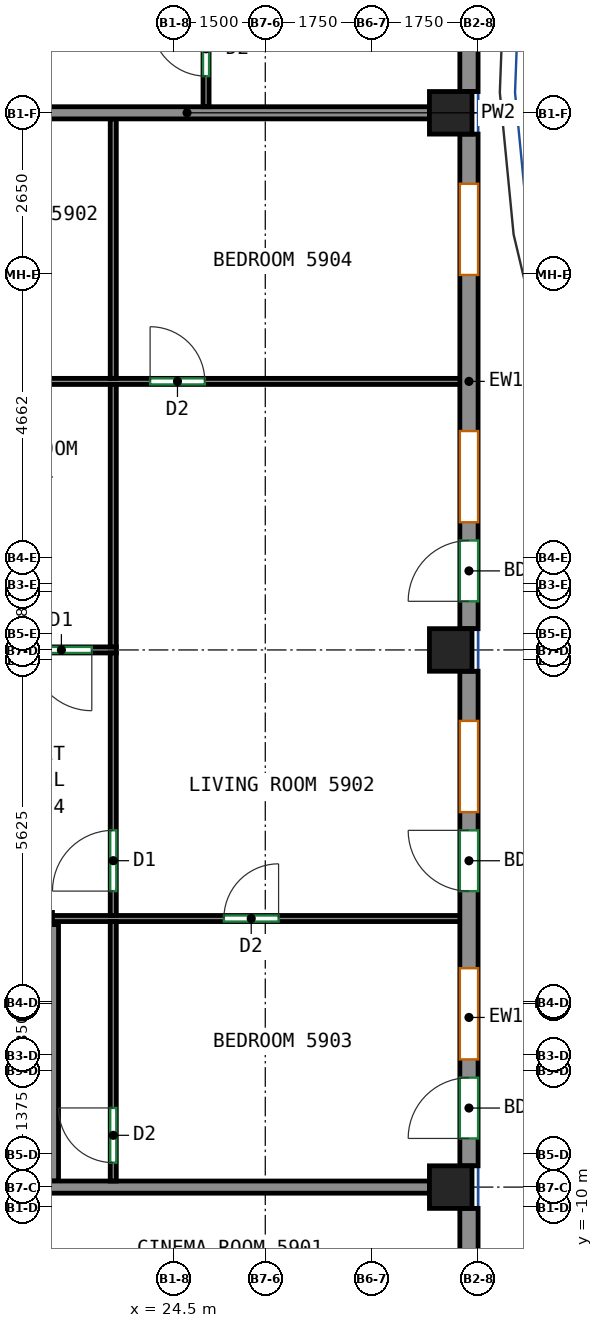
"""IFC4 building model, lengths in metres.
Left out: names, types, materials, properties, quantities, classifications, styles, units other than length and angle.
Written with IfcOpenShell. Run it as: python <this file> out.ifc"""

import sys

from ifc_helpers import new_model, si_unit, direction, frame, frame_2d, origin, origin_2d, place, context, subcontext, project, spatial, rectangle, extrude, source, transform, mapped, element, fill, save


model = new_model("IFC4")
c1 = context("Model", 3, precision=1e-05, world=origin(), true_north=direction((0.0, 1.0)))
c2 = subcontext(c1, "Body", "Model", "MODEL_VIEW")
j1 = project(units=[si_unit("LENGTHUNIT", "METRE"), si_unit("PLANEANGLEUNIT", "RADIAN")], contexts=[c1])
p1 = place(None, origin())
s1 = spatial("IfcSite", under=j1, at=p1, CompositionType="ELEMENT")
p2 = place(p1, origin())
s2 = spatial("IfcBuilding", under=s1, at=p2, CompositionType="ELEMENT")
p3 = place(p2, frame((0.0, 0.0, 245.8)))
s3 = spatial("IfcBuildingStorey", under=s2, at=p3, CompositionType="ELEMENT", Elevation=245.8)
m1 = source(origin(), c2, "Body", "SweptSolid", [
    extrude(rectangle(XDim=0.7, YDim=0.7, at=origin_2d()), origin(), (0.0, 0.0, 1.0), 3.12),
])
for number, where, z_axis, x_axis in (
    (1, (29.05, -9.667, 0.0), (0.0, 0.0, 1.0), (1.0, 0.0, 0.0)),
    (2, (29.05, -0.833, 0.0), (0.0, 0.0, 1.0), (1.0, 0.0, 0.0)),
    (3, (29.05, 8.0, 0.0), (0.0, 0.0, 1.0), (1.0, 0.0, 0.0)),
):
    element("IfcColumn", number, at=place(p3, frame(where, z_axis=z_axis, x_axis=x_axis)), inside=s3, PredefinedType="COLUMN", context=c2, shape_type="MappedRepresentation", body=[
        mapped(m1, transform((0.0, 0.0, 0.0))),
    ])
m2 = source(origin(), c2, "Body", "SweptSolid", [
    extrude(rectangle(XDim=4.315, YDim=0.3, at=frame_2d((2.158, 0.0))), origin(), (0.0, 0.0, 1.0), 3.12),
])
p4 = place(p3, frame((29.35, -14.332, 0.0), z_axis=(0.0, 0.0, 1.0), x_axis=(0.0, 1.0, 0.0)))
e4 = element("IfcWall", 4, at=p4, inside=s3, PredefinedType="SOLIDWALL", context=c2, shape_type="MappedRepresentation", body=[
    mapped(m2, transform((0.0, 0.0, 0.0))),
])
p5 = place(p4, frame((1.75, 0.0, 0.8)))
e5 = element("IfcOpeningElement", 5, at=p5, cuts=e4, PredefinedType="OPENING", context=c2, shape_type="SweptSolid", body=[
    extrude(rectangle(XDim=1.5, YDim=2.05, at=frame_2d((0.75, 1.025))), frame((0.0, 0.16, 0.0), z_axis=(0.0, -1.0, 0.0), x_axis=(1.0, 0.0, 0.0)), (0.0, 0.0, 1.0), 0.32),
])
m3 = source(origin(), c2, "Body", "SweptSolid", [
    extrude(rectangle(XDim=8.133, YDim=0.3, at=frame_2d((4.067, 0.0))), origin(), (0.0, 0.0, 1.0), 3.12),
])
p6 = place(p3, frame((29.35, -9.317, 0.0), z_axis=(0.0, 0.0, 1.0), x_axis=(0.0, 1.0, 0.0)))
e6 = element("IfcWall", 6, at=p6, inside=s3, PredefinedType="SOLIDWALL", context=c2, shape_type="MappedRepresentation", body=[
    mapped(m3, transform((0.0, 0.0, 0.0))),
])
p7 = place(p6, frame((1.75, 0.0, 0.8)))
e7 = element("IfcOpeningElement", 7, at=p7, cuts=e6, PredefinedType="OPENING", context=c2, shape_type="SweptSolid", body=[
    extrude(rectangle(XDim=1.5, YDim=2.05, at=frame_2d((0.75, 1.025))), frame((0.0, 0.16, 0.0), z_axis=(0.0, -1.0, 0.0), x_axis=(1.0, 0.0, 0.0)), (0.0, 0.0, 1.0), 0.32),
])
p8 = place(p6, frame((0.45, 0.0, 0.0)))
e8 = element("IfcOpeningElement", 8, at=p8, cuts=e6, PredefinedType="OPENING", context=c2, shape_type="SweptSolid", body=[
    extrude(rectangle(XDim=1.0, YDim=2.1, at=frame_2d((0.5, 1.05))), frame((0.0, 0.16, 0.0), z_axis=(0.0, -1.0, 0.0), x_axis=(1.0, 0.0, 0.0)), (0.0, 0.0, 1.0), 0.32),
])
p9 = place(p6, frame((5.817, 0.0, 0.8)))
e9 = element("IfcOpeningElement", 9, at=p9, cuts=e6, PredefinedType="OPENING", context=c2, shape_type="SweptSolid", body=[
    extrude(rectangle(XDim=1.5, YDim=2.05, at=frame_2d((0.75, 1.025))), frame((0.0, 0.16, 0.0), z_axis=(0.0, -1.0, 0.0), x_axis=(1.0, 0.0, 0.0)), (0.0, 0.0, 1.0), 0.32),
])
p10 = place(p6, frame((4.517, 0.0, 0.0)))
e10 = element("IfcOpeningElement", 10, at=p10, cuts=e6, PredefinedType="OPENING", context=c2, shape_type="SweptSolid", body=[
    extrude(rectangle(XDim=1.0, YDim=2.1, at=frame_2d((0.5, 1.05))), frame((0.0, 0.16, 0.0), z_axis=(0.0, -1.0, 0.0), x_axis=(1.0, 0.0, 0.0)), (0.0, 0.0, 1.0), 0.32),
])
p11 = place(p3, frame((29.35, -0.483, 0.0), z_axis=(0.0, 0.0, 1.0), x_axis=(0.0, 1.0, 0.0)))
e11 = element("IfcWall", 11, at=p11, inside=s3, PredefinedType="SOLIDWALL", context=c2, shape_type="MappedRepresentation", body=[
    mapped(m3, transform((0.0, 0.0, 0.0))),
])
p12 = place(p11, frame((1.75, 0.0, 0.8)))
e12 = element("IfcOpeningElement", 12, at=p12, cuts=e11, PredefinedType="OPENING", context=c2, shape_type="SweptSolid", body=[
    extrude(rectangle(XDim=1.5, YDim=2.05, at=frame_2d((0.75, 1.025))), frame((0.0, 0.16, 0.0), z_axis=(0.0, -1.0, 0.0), x_axis=(1.0, 0.0, 0.0)), (0.0, 0.0, 1.0), 0.32),
])
p13 = place(p11, frame((0.45, 0.0, 0.0)))
e13 = element("IfcOpeningElement", 13, at=p13, cuts=e11, PredefinedType="OPENING", context=c2, shape_type="SweptSolid", body=[
    extrude(rectangle(XDim=1.0, YDim=2.1, at=frame_2d((0.5, 1.05))), frame((0.0, 0.16, 0.0), z_axis=(0.0, -1.0, 0.0), x_axis=(1.0, 0.0, 0.0)), (0.0, 0.0, 1.0), 0.32),
])
p14 = place(p11, frame((5.817, 0.0, 0.8)))
e14 = element("IfcOpeningElement", 14, at=p14, cuts=e11, PredefinedType="OPENING", context=c2, shape_type="SweptSolid", body=[
    extrude(rectangle(XDim=1.5, YDim=2.05, at=frame_2d((0.75, 1.025))), frame((0.0, 0.16, 0.0), z_axis=(0.0, -1.0, 0.0), x_axis=(1.0, 0.0, 0.0)), (0.0, 0.0, 1.0), 0.32),
])
m4 = source(origin(), c2, "Body", "SweptSolid", [
    extrude(rectangle(XDim=13.3, YDim=0.3, at=frame_2d((6.65, 0.0))), origin(), (0.0, 0.0, 1.0), 3.12),
])
p15 = place(p3, frame((29.35, 8.35, 0.0), z_axis=(0.0, 0.0, 1.0), x_axis=(0.0, 1.0, 0.0)))
e15 = element("IfcWall", 15, at=p15, inside=s3, PredefinedType="SOLIDWALL", context=c2, shape_type="MappedRepresentation", body=[
    mapped(m4, transform((0.0, 0.0, 0.0))),
])
p16 = place(p15, frame((0.913, 0.0, 0.8)))
e16 = element("IfcOpeningElement", 16, at=p16, cuts=e15, PredefinedType="OPENING", context=c2, shape_type="SweptSolid", body=[
    extrude(rectangle(XDim=1.5, YDim=2.05, at=frame_2d((0.75, 1.025))), frame((0.0, 0.16, 0.0), z_axis=(0.0, -1.0, 0.0), x_axis=(1.0, 0.0, 0.0)), (0.0, 0.0, 1.0), 0.32),
])
p17 = place(p15, frame((4.238, 0.0, 0.8)))
e17 = element("IfcOpeningElement", 17, at=p17, cuts=e15, PredefinedType="OPENING", context=c2, shape_type="SweptSolid", body=[
    extrude(rectangle(XDim=1.5, YDim=2.05, at=frame_2d((0.75, 1.025))), frame((0.0, 0.16, 0.0), z_axis=(0.0, -1.0, 0.0), x_axis=(1.0, 0.0, 0.0)), (0.0, 0.0, 1.0), 0.32),
])
p18 = place(p15, frame((7.562, 0.0, 0.8)))
e18 = element("IfcOpeningElement", 18, at=p18, cuts=e15, PredefinedType="OPENING", context=c2, shape_type="SweptSolid", body=[
    extrude(rectangle(XDim=1.5, YDim=2.05, at=frame_2d((0.75, 1.025))), frame((0.0, 0.16, 0.0), z_axis=(0.0, -1.0, 0.0), x_axis=(1.0, 0.0, 0.0)), (0.0, 0.0, 1.0), 0.32),
])
p19 = place(p15, frame((10.887, 0.0, 0.8)))
e19 = element("IfcOpeningElement", 19, at=p19, cuts=e15, PredefinedType="OPENING", context=c2, shape_type="SweptSolid", body=[
    extrude(rectangle(XDim=1.5, YDim=2.05, at=frame_2d((0.75, 1.025))), frame((0.0, 0.16, 0.0), z_axis=(0.0, -1.0, 0.0), x_axis=(1.0, 0.0, 0.0)), (0.0, 0.0, 1.0), 0.32),
])
p20 = place(p3, frame((22.5, -9.567, 0.0), z_axis=(0.0, 0.0, 1.0), x_axis=(0.0, 1.0, 0.0)))
e20 = element("IfcWall", 20, at=p20, inside=s3, PredefinedType="PARTITIONING", context=c2, shape_type="SweptSolid", body=[
    extrude(rectangle(XDim=4.217, YDim=0.2, at=frame_2d((2.108, 0.0))), origin(), (0.0, 0.0, 1.0), 3.12),
])
p21 = place(p3, frame((22.4, -9.667, 0.0), z_axis=(0.0, 0.0, 1.0), x_axis=(1.0, 0.0, 0.0)))
e21 = element("IfcWall", 21, at=p21, inside=s3, PredefinedType="PARTITIONING", context=c2, shape_type="SweptSolid", body=[
    extrude(rectangle(XDim=6.3, YDim=0.2, at=frame_2d((3.15, 0.0))), origin(), (0.0, 0.0, 1.0), 3.12),
])
p22 = place(p3, frame((22.5, -5.25, 0.0), z_axis=(0.0, 0.0, 1.0), x_axis=(1.0, 0.0, 0.0)))
e22 = element("IfcWall", 22, at=p22, inside=s3, PredefinedType="PARTITIONING", context=c2, shape_type="SweptSolid", body=[
    extrude(rectangle(XDim=6.75, YDim=0.1, at=frame_2d((3.375, 0.0))), origin(), (0.0, 0.0, 1.0), 3.12),
])
p23 = place(p22, frame((2.819, 0.0, 0.0)))
e23 = element("IfcOpeningElement", 23, at=p23, cuts=e22, PredefinedType="OPENING", context=c2, shape_type="SweptSolid", body=[
    extrude(rectangle(XDim=0.9, YDim=2.1, at=frame_2d((0.45, 1.05))), frame((0.0, 0.06, 0.0), z_axis=(0.0, -1.0, 0.0), x_axis=(1.0, 0.0, 0.0)), (0.0, 0.0, 1.0), 0.12),
])
p24 = place(p3, frame((23.5, -9.567, 0.0), z_axis=(0.0, 0.0, 1.0), x_axis=(0.0, 1.0, 0.0)))
e24 = element("IfcWall", 24, at=p24, inside=s3, PredefinedType="PARTITIONING", context=c2, shape_type="SweptSolid", body=[
    extrude(rectangle(XDim=4.267, YDim=0.1, at=frame_2d((2.133, 0.0))), origin(), (0.0, 0.0, 1.0), 3.12),
])
p25 = place(p24, frame((0.302, 0.0, 0.0)))
e25 = element("IfcOpeningElement", 25, at=p25, cuts=e24, PredefinedType="OPENING", context=c2, shape_type="SweptSolid", body=[
    extrude(rectangle(XDim=0.9, YDim=2.1, at=frame_2d((0.45, 1.05))), frame((0.0, 0.06, 0.0), z_axis=(0.0, -1.0, 0.0), x_axis=(1.0, 0.0, 0.0)), (0.0, 0.0, 1.0), 0.12),
])
p26 = place(p3, frame((23.55, -0.833, 0.0), z_axis=(0.0, 0.0, 1.0), x_axis=(-1.0, 0.0, 0.0)))
e26 = element("IfcWall", 26, at=p26, inside=s3, PredefinedType="PARTITIONING", context=c2, shape_type="SweptSolid", body=[
    extrude(rectangle(XDim=2.823, YDim=0.1, at=frame_2d((1.412, 0.0))), origin(), (0.0, 0.0, 1.0), 2.57),
])
p27 = place(p26, frame((0.403, 0.0, 0.0)))
e27 = element("IfcOpeningElement", 27, at=p27, cuts=e26, PredefinedType="OPENING", context=c2, shape_type="SweptSolid", body=[
    extrude(rectangle(XDim=1.0, YDim=2.1, at=frame_2d((0.5, 1.05))), frame((0.0, 0.06, 0.0), z_axis=(0.0, -1.0, 0.0), x_axis=(1.0, 0.0, 0.0)), (0.0, 0.0, 1.0), 0.12),
])
p28 = place(p3, frame((23.5, -5.2, 0.0), z_axis=(0.0, 0.0, 1.0), x_axis=(0.0, 1.0, 0.0)))
e28 = element("IfcWall", 28, at=p28, inside=s3, PredefinedType="PARTITIONING", context=c2, shape_type="SweptSolid", body=[
    extrude(rectangle(XDim=4.317, YDim=0.1, at=frame_2d((2.158, 0.0))), origin(), (0.0, 0.0, 1.0), 3.12),
])
p29 = place(p28, frame((0.401, 0.0, 0.0)))
e29 = element("IfcOpeningElement", 29, at=p29, cuts=e28, PredefinedType="OPENING", context=c2, shape_type="SweptSolid", body=[
    extrude(rectangle(XDim=1.0, YDim=2.1, at=frame_2d((0.5, 1.05))), frame((0.0, 0.06, 0.0), z_axis=(0.0, -1.0, 0.0), x_axis=(1.0, 0.0, 0.0)), (0.0, 0.0, 1.0), 0.12),
])
p30 = place(p3, frame((20.727, 3.583, 0.0), z_axis=(0.0, 0.0, 1.0), x_axis=(1.0, 0.0, 0.0)))
e30 = element("IfcWall", 30, at=p30, inside=s3, PredefinedType="PARTITIONING", context=c2, shape_type="SweptSolid", body=[
    extrude(rectangle(XDim=8.523, YDim=0.1, at=frame_2d((4.261, 0.0))), origin(), (0.0, 0.0, 1.0), 3.12),
])
p31 = place(p30, frame((0.41, 0.0, 0.0)))
e31 = element("IfcOpeningElement", 31, at=p31, cuts=e30, PredefinedType="OPENING", context=c2, shape_type="SweptSolid", body=[
    extrude(rectangle(XDim=0.9, YDim=2.1, at=frame_2d((0.45, 1.05))), frame((0.0, 0.06, 0.0), z_axis=(0.0, -1.0, 0.0), x_axis=(1.0, 0.0, 0.0)), (0.0, 0.0, 1.0), 0.12),
])
p32 = place(p30, frame((3.379, 0.0, 0.0)))
e32 = element("IfcOpeningElement", 32, at=p32, cuts=e30, PredefinedType="OPENING", context=c2, shape_type="SweptSolid", body=[
    extrude(rectangle(XDim=0.9, YDim=2.1, at=frame_2d((0.45, 1.05))), frame((0.0, 0.06, 0.0), z_axis=(0.0, -1.0, 0.0), x_axis=(1.0, 0.0, 0.0)), (0.0, 0.0, 1.0), 0.12),
])
p33 = place(p3, frame((23.5, -0.783, 0.0), z_axis=(0.0, 0.0, 1.0), x_axis=(0.0, 1.0, 0.0)))
e33 = element("IfcWall", 33, at=p33, inside=s3, PredefinedType="PARTITIONING", context=c2, shape_type="SweptSolid", body=[
    extrude(rectangle(XDim=4.316, YDim=0.1, at=frame_2d((2.158, 0.0))), origin(), (0.0, 0.0, 1.0), 3.12),
])
p34 = place(p3, frame((23.5, 3.633, 0.0), z_axis=(0.0, 0.0, 1.0), x_axis=(0.0, 1.0, 0.0)))
e34 = element("IfcWall", 34, at=p34, inside=s3, PredefinedType="PARTITIONING", context=c2, shape_type="SweptSolid", body=[
    extrude(rectangle(XDim=4.267, YDim=0.1, at=frame_2d((2.133, 0.0))), origin(), (0.0, 0.0, 1.0), 3.12),
])
p35 = place(p3, frame((20.727, 8.0, 0.0), z_axis=(0.0, 0.0, 1.0), x_axis=(1.0, 0.0, 0.0)))
e35 = element("IfcWall", 35, at=p35, inside=s3, PredefinedType="PARTITIONING", context=c2, shape_type="SweptSolid", body=[
    extrude(rectangle(XDim=7.973, YDim=0.2, at=frame_2d((3.986, 0.0))), origin(), (0.0, 0.0, 1.0), 2.57),
])
p36 = place(p3, frame((25.026, 8.1, 0.0), z_axis=(0.0, 0.0, 1.0), x_axis=(0.0, 1.0, 0.0)))
e36 = element("IfcWall", 36, at=p36, inside=s3, PredefinedType="PARTITIONING", context=c2, shape_type="SweptSolid", body=[
    extrude(rectangle(XDim=6.85, YDim=0.1, at=frame_2d((3.425, 0.0))), origin(), (0.0, 0.0, 1.0), 3.12),
])
p37 = place(p36, frame((0.503, 0.0, 0.0)))
e37 = element("IfcOpeningElement", 37, at=p37, cuts=e36, PredefinedType="OPENING", context=c2, shape_type="SweptSolid", body=[
    extrude(rectangle(XDim=0.9, YDim=2.1, at=frame_2d((0.45, 1.05))), frame((0.0, 0.06, 0.0), z_axis=(0.0, -1.0, 0.0), x_axis=(1.0, 0.0, 0.0)), (0.0, 0.0, 1.0), 0.12),
])
p38 = place(p7, origin())
e38 = element("IfcWindow", 38, at=p38, inside=s3, PartitioningType="SINGLE_PANEL", PredefinedType="WINDOW", context=c2, shape_type="SweptSolid", body=[
    extrude(rectangle(XDim=1.5, YDim=2.05, at=frame_2d((0.75, 1.025))), frame((0.0, 0.03, 0.0), z_axis=(0.0, -1.0, 0.0), x_axis=(1.0, 0.0, 0.0)), (0.0, 0.0, 1.0), 0.06),
])
fill(e7, e38)
p39 = place(p8, origin())
e39 = element("IfcDoor", 39, at=p39, inside=s3, OperationType="SINGLE_SWING_LEFT", PredefinedType="DOOR", context=c2, shape_type="SweptSolid", body=[
    extrude(rectangle(XDim=1.0, YDim=2.1, at=frame_2d((0.5, 1.05))), frame((0.0, 0.025, 0.0), z_axis=(0.0, -1.0, 0.0), x_axis=(1.0, 0.0, 0.0)), (0.0, 0.0, 1.0), 0.05),
])
fill(e8, e39)
p40 = place(p9, origin())
e40 = element("IfcWindow", 40, at=p40, inside=s3, PartitioningType="SINGLE_PANEL", PredefinedType="WINDOW", context=c2, shape_type="SweptSolid", body=[
    extrude(rectangle(XDim=1.5, YDim=2.05, at=frame_2d((0.75, 1.025))), frame((0.0, 0.03, 0.0), z_axis=(0.0, -1.0, 0.0), x_axis=(1.0, 0.0, 0.0)), (0.0, 0.0, 1.0), 0.06),
])
fill(e9, e40)
p41 = place(p10, origin())
e41 = element("IfcDoor", 41, at=p41, inside=s3, OperationType="SINGLE_SWING_RIGHT", PredefinedType="DOOR", context=c2, shape_type="SweptSolid", body=[
    extrude(rectangle(XDim=1.0, YDim=2.1, at=frame_2d((0.5, 1.05))), frame((0.0, 0.025, 0.0), z_axis=(0.0, -1.0, 0.0), x_axis=(1.0, 0.0, 0.0)), (0.0, 0.0, 1.0), 0.05),
])
fill(e10, e41)
p42 = place(p12, origin())
e42 = element("IfcWindow", 42, at=p42, inside=s3, PartitioningType="SINGLE_PANEL", PredefinedType="WINDOW", context=c2, shape_type="SweptSolid", body=[
    extrude(rectangle(XDim=1.5, YDim=2.05, at=frame_2d((0.75, 1.025))), frame((0.0, 0.03, 0.0), z_axis=(0.0, -1.0, 0.0), x_axis=(1.0, 0.0, 0.0)), (0.0, 0.0, 1.0), 0.06),
])
fill(e12, e42)
p43 = place(p13, origin())
e43 = element("IfcDoor", 43, at=p43, inside=s3, OperationType="SINGLE_SWING_LEFT", PredefinedType="DOOR", context=c2, shape_type="SweptSolid", body=[
    extrude(rectangle(XDim=1.0, YDim=2.1, at=frame_2d((0.5, 1.05))), frame((0.0, 0.025, 0.0), z_axis=(0.0, -1.0, 0.0), x_axis=(1.0, 0.0, 0.0)), (0.0, 0.0, 1.0), 0.05),
])
fill(e13, e43)
p44 = place(p14, origin())
e44 = element("IfcWindow", 44, at=p44, inside=s3, PartitioningType="SINGLE_PANEL", PredefinedType="WINDOW", context=c2, shape_type="SweptSolid", body=[
    extrude(rectangle(XDim=1.5, YDim=2.05, at=frame_2d((0.75, 1.025))), frame((0.0, 0.03, 0.0), z_axis=(0.0, -1.0, 0.0), x_axis=(1.0, 0.0, 0.0)), (0.0, 0.0, 1.0), 0.06),
])
fill(e14, e44)
p45 = place(p25, origin())
e45 = element("IfcDoor", 45, at=p45, inside=s3, OperationType="SINGLE_SWING_RIGHT", PredefinedType="DOOR", context=c2, shape_type="SweptSolid", body=[
    extrude(rectangle(XDim=0.9, YDim=2.1, at=frame_2d((0.45, 1.05))), frame((0.0, 0.025, 0.0), z_axis=(0.0, -1.0, 0.0), x_axis=(1.0, 0.0, 0.0)), (0.0, 0.0, 1.0), 0.05),
])
fill(e25, e45)
p46 = place(p23, origin())
e46 = element("IfcDoor", 46, at=p46, inside=s3, OperationType="SINGLE_SWING_RIGHT", PredefinedType="DOOR", context=c2, shape_type="SweptSolid", body=[
    extrude(rectangle(XDim=0.9, YDim=2.1, at=frame_2d((0.45, 1.05))), frame((0.0, 0.025, 0.0), z_axis=(0.0, -1.0, 0.0), x_axis=(1.0, 0.0, 0.0)), (0.0, 0.0, 1.0), 0.05),
])
fill(e23, e46)
p47 = place(p29, origin())
e47 = element("IfcDoor", 47, at=p47, inside=s3, OperationType="SINGLE_SWING_LEFT", PredefinedType="DOOR", context=c2, shape_type="SweptSolid", body=[
    extrude(rectangle(XDim=1.0, YDim=2.1, at=frame_2d((0.5, 1.05))), frame((0.0, 0.025, 0.0), z_axis=(0.0, -1.0, 0.0), x_axis=(1.0, 0.0, 0.0)), (0.0, 0.0, 1.0), 0.05),
])
fill(e29, e47)
p48 = place(p27, origin())
e48 = element("IfcDoor", 48, at=p48, inside=s3, OperationType="SINGLE_SWING_LEFT", PredefinedType="DOOR", context=c2, shape_type="SweptSolid", body=[
    extrude(rectangle(XDim=1.0, YDim=2.1, at=frame_2d((0.5, 1.05))), frame((0.0, 0.025, 0.0), z_axis=(0.0, -1.0, 0.0), x_axis=(1.0, 0.0, 0.0)), (0.0, 0.0, 1.0), 0.05),
])
fill(e27, e48)
p49 = place(p32, origin())
e49 = element("IfcDoor", 49, at=p49, inside=s3, OperationType="SINGLE_SWING_LEFT", PredefinedType="DOOR", context=c2, shape_type="SweptSolid", body=[
    extrude(rectangle(XDim=0.9, YDim=2.1, at=frame_2d((0.45, 1.05))), frame((0.0, 0.025, 0.0), z_axis=(0.0, -1.0, 0.0), x_axis=(1.0, 0.0, 0.0)), (0.0, 0.0, 1.0), 0.05),
])
fill(e32, e49)
p50 = place(p37, origin())
e50 = element("IfcDoor", 50, at=p50, inside=s3, OperationType="SINGLE_SWING_RIGHT", PredefinedType="DOOR", context=c2, shape_type="SweptSolid", body=[
    extrude(rectangle(XDim=0.9, YDim=2.1, at=frame_2d((0.45, 1.05))), frame((0.0, 0.025, 0.0), z_axis=(0.0, -1.0, 0.0), x_axis=(1.0, 0.0, 0.0)), (0.0, 0.0, 1.0), 0.05),
])
fill(e37, e50)
save(model, sys.argv[1])
